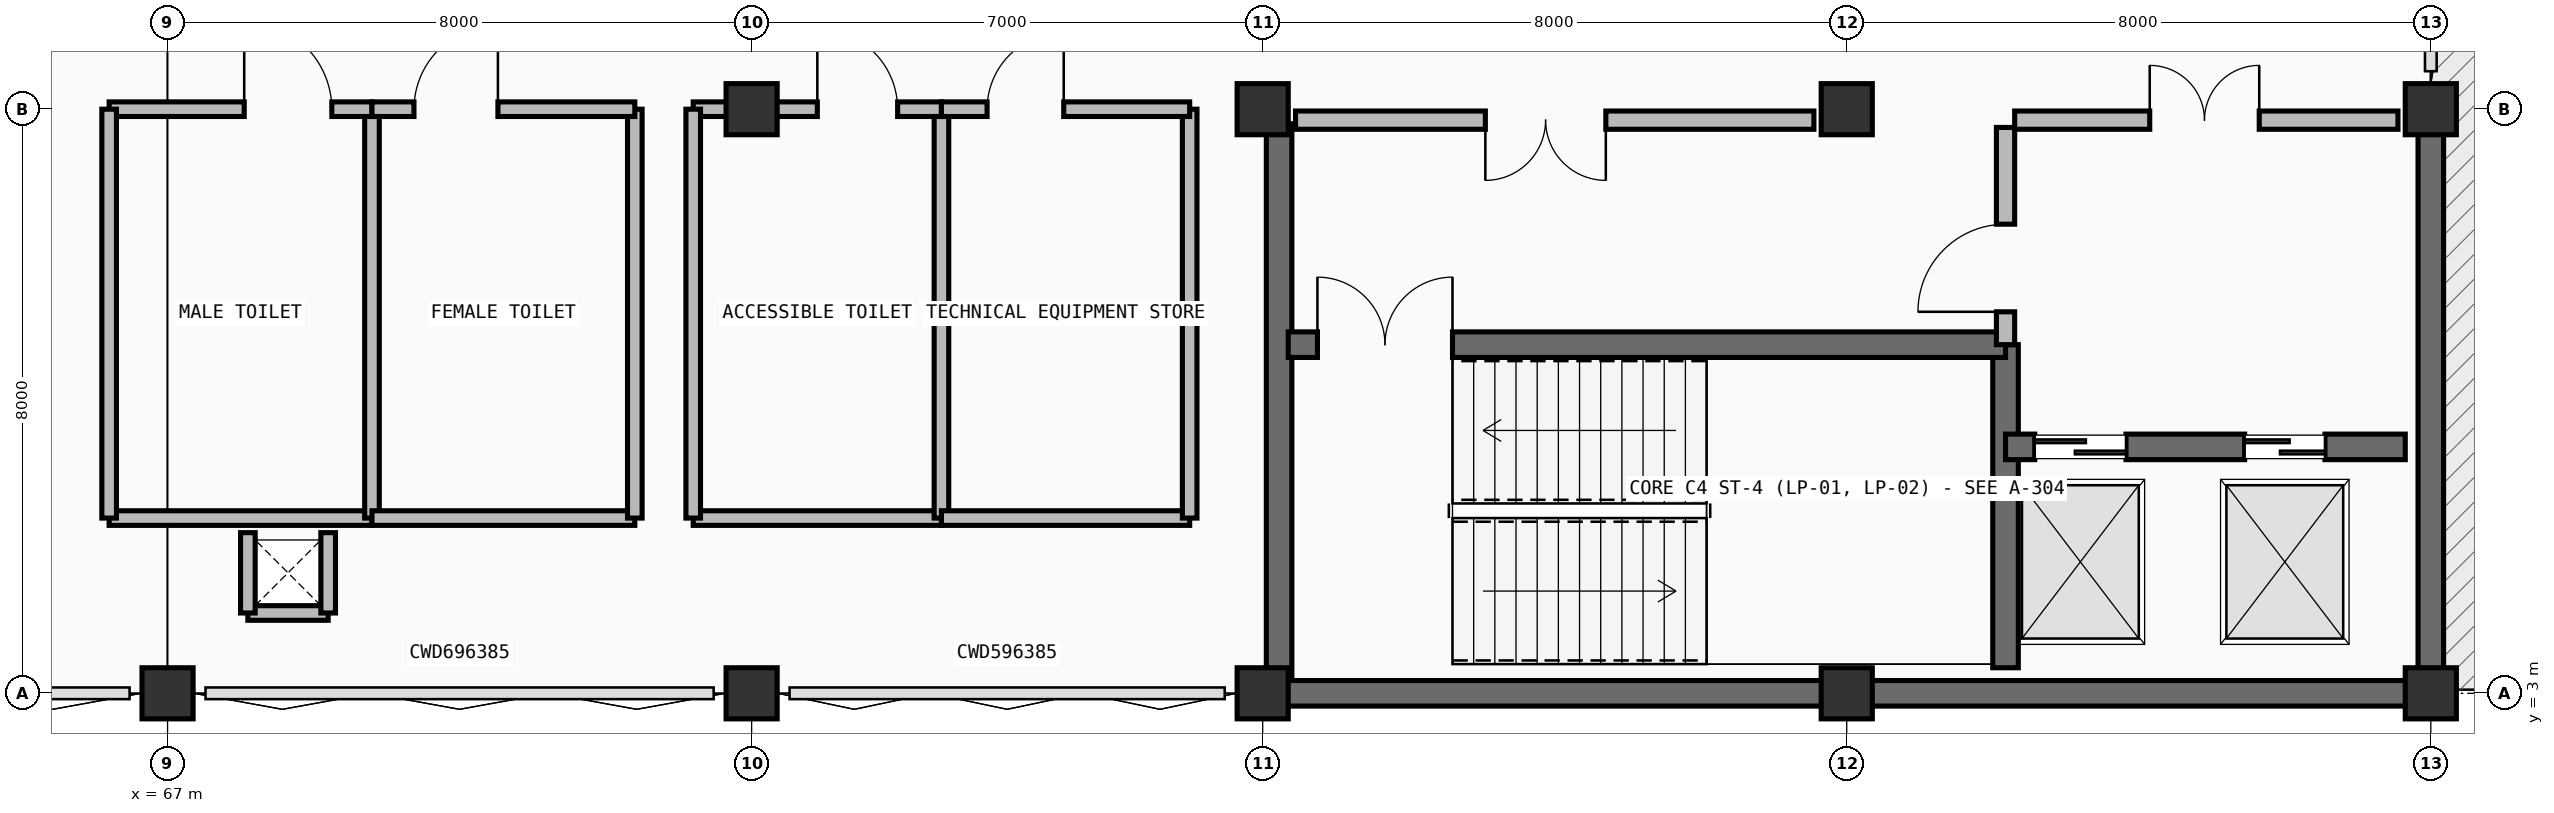
"""IFC4 building model, lengths in metres.
Left out: names, types, materials, properties, quantities, classifications, styles, units other than length and angle.
Written with IfcOpenShell. Run it as: python <this file> out.ifc"""

import sys

from ifc_helpers import new_model, si_unit, direction, frame, frame_2d, origin, origin_2d, place, context, subcontext, project, spatial, rectangle, extrude, element, fill, save


model = new_model("IFC4")
c1 = context("Model", 3, precision=1e-05, world=origin(), true_north=direction((0.0, 1.0)))
c2 = subcontext(c1, "Body", "Model", "MODEL_VIEW")
j1 = project(units=[si_unit("LENGTHUNIT", "METRE"), si_unit("PLANEANGLEUNIT", "RADIAN")], contexts=[c1])
p1 = place(None, origin())
s1 = spatial("IfcSite", under=j1, at=p1, CompositionType="ELEMENT")
p2 = place(p1, origin())
s2 = spatial("IfcBuilding", under=s1, at=p2, CompositionType="ELEMENT")
p3 = place(p2, frame((0.0, 0.0, 14.4)))
s3 = spatial("IfcBuildingStorey", under=s2, at=p3, CompositionType="ELEMENT", Elevation=14.4)
for number, where, z_axis, x_axis in (
    (1, (67.0, 3.0, 0.0), (0.0, 0.0, 1.0), (1.0, 0.0, 0.0)),
    (2, (75.0, 3.0, 0.0), (0.0, 0.0, 1.0), (1.0, 0.0, 0.0)),
    (3, (75.0, 11.0, 0.0), (0.0, 0.0, 1.0), (1.0, 0.0, 0.0)),
    (4, (82.0, 3.0, 0.0), (0.0, 0.0, 1.0), (1.0, 0.0, 0.0)),
    (5, (82.0, 11.0, 0.0), (0.0, 0.0, 1.0), (1.0, 0.0, 0.0)),
    (6, (90.0, 3.0, 0.0), (0.0, 0.0, 1.0), (1.0, 0.0, 0.0)),
    (7, (90.0, 11.0, 0.0), (0.0, 0.0, 1.0), (1.0, 0.0, 0.0)),
    (8, (98.0, 3.0, 0.0), (0.0, 0.0, 1.0), (1.0, 0.0, 0.0)),
    (9, (98.0, 11.0, 0.0), (0.0, 0.0, 1.0), (1.0, 0.0, 0.0)),
):
    element("IfcColumn", number, at=place(p3, frame(where, z_axis=z_axis, x_axis=x_axis)), inside=s3, PredefinedType="COLUMN", context=c2, shape_type="SweptSolid", body=[
        extrude(rectangle(XDim=0.7, YDim=0.7, at=origin_2d()), origin(), (0.0, 0.0, 1.0), 4.5),
    ])
for number, where, z_axis, x_axis in (
    (10, (98.0, 11.0, 0.0), (0.0, 0.0, 1.0), (0.0, -1.0, 0.0)),
    (11, (98.0, 3.0, 0.0), (0.0, 0.0, 1.0), (-1.0, 0.0, 0.0)),
    (12, (90.0, 3.0, 0.0), (0.0, 0.0, 1.0), (-1.0, 0.0, 0.0)),
):
    element("IfcWall", number, at=place(p3, frame(where, z_axis=z_axis, x_axis=x_axis)), inside=s3, PredefinedType="SHEAR", context=c2, shape_type="SweptSolid", body=[
        extrude(rectangle(XDim=8.0, YDim=0.35, at=frame_2d((4.0, 0.0))), origin(), (0.0, 0.0, 1.0), 4.5),
    ])
p4 = place(p3, frame((82.225, 3.2, 0.0), z_axis=(0.0, 0.0, 1.0), x_axis=(0.0, 1.0, 0.0)))
e13 = element("IfcWall", 13, at=p4, inside=s3, PredefinedType="SHEAR", context=c2, shape_type="SweptSolid", body=[
    extrude(rectangle(XDim=7.6, YDim=0.35, at=frame_2d((3.8, 0.0))), origin(), (0.0, 0.0, 1.0), 4.2),
])
p5 = place(p3, frame((92.175, 3.35, 0.0), z_axis=(0.0, 0.0, 1.0), x_axis=(0.0, 1.0, 0.0)))
e14 = element("IfcWall", 14, at=p5, inside=s3, PredefinedType="SHEAR", context=c2, shape_type="SweptSolid", body=[
    extrude(rectangle(XDim=4.425, YDim=0.35, at=frame_2d((2.212, 0.0))), origin(), (0.0, 0.0, 1.0), 4.2),
])
p6 = place(p3, frame((82.35, 7.775, 0.0), z_axis=(0.0, 0.0, 1.0), x_axis=(1.0, 0.0, 0.0)))
e15 = element("IfcWall", 15, at=p6, inside=s3, PredefinedType="SHEAR", context=c2, shape_type="SweptSolid", body=[
    extrude(rectangle(XDim=9.825, YDim=0.35, at=frame_2d((4.913, 0.0))), origin(), (0.0, 0.0, 1.0), 4.2),
])
p7 = place(p6, frame((0.4, 0.0, 0.0)))
e16 = element("IfcOpeningElement", 16, at=p7, cuts=e15, PredefinedType="OPENING", context=c2, shape_type="SweptSolid", body=[
    extrude(rectangle(XDim=1.85, YDim=2.25, at=frame_2d((0.925, 1.125))), frame((0.0, 0.185, 0.0), z_axis=(0.0, -1.0, 0.0), x_axis=(1.0, 0.0, 0.0)), (0.0, 0.0, 1.0), 0.37),
])
p8 = place(p3, frame((92.175, 6.375, 0.0), z_axis=(0.0, 0.0, 1.0), x_axis=(1.0, 0.0, 0.0)))
e17 = element("IfcWall", 17, at=p8, inside=s3, PredefinedType="SHEAR", context=c2, shape_type="SweptSolid", body=[
    extrude(rectangle(XDim=5.475, YDim=0.35, at=frame_2d((2.737, 0.0))), origin(), (0.0, 0.0, 1.0), 4.2),
])
p9 = place(p8, frame((0.4, 0.0, 0.0)))
e18 = element("IfcOpeningElement", 18, at=p9, cuts=e17, PredefinedType="OPENING", context=c2, shape_type="SweptSolid", body=[
    extrude(rectangle(XDim=1.25, YDim=2.25, at=frame_2d((0.625, 1.125))), frame((0.0, 0.185, 0.0), z_axis=(0.0, -1.0, 0.0), x_axis=(1.0, 0.0, 0.0)), (0.0, 0.0, 1.0), 0.37),
])
p10 = place(p8, frame((3.275, 0.0, 0.0)))
e19 = element("IfcOpeningElement", 19, at=p10, cuts=e17, PredefinedType="OPENING", context=c2, shape_type="SweptSolid", body=[
    extrude(rectangle(XDim=1.1, YDim=2.2, at=frame_2d((0.55, 1.1))), frame((0.0, 0.185, 0.0), z_axis=(0.0, -1.0, 0.0), x_axis=(1.0, 0.0, 0.0)), (0.0, 0.0, 1.0), 0.37),
])
p11 = place(p3, frame((92.175, 7.775, 0.0), z_axis=(0.0, 0.0, 1.0), x_axis=(0.0, 1.0, 0.0)))
e20 = element("IfcWall", 20, at=p11, inside=s3, PredefinedType="PARTITIONING", context=c2, shape_type="SweptSolid", body=[
    extrude(rectangle(XDim=2.975, YDim=0.25, at=frame_2d((1.488, 0.0))), origin(), (0.0, 0.0, 1.0), 4.2),
])
p12 = place(p11, frame((0.45, 0.0, 0.0)))
e21 = element("IfcOpeningElement", 21, at=p12, cuts=e20, PredefinedType="OPENING", context=c2, shape_type="SweptSolid", body=[
    extrude(rectangle(XDim=1.2, YDim=2.2, at=frame_2d((0.6, 1.1))), frame((0.0, 0.135, 0.0), z_axis=(0.0, -1.0, 0.0), x_axis=(1.0, 0.0, 0.0)), (0.0, 0.0, 1.0), 0.27),
])
p13 = place(p3, frame((82.45, 10.85, 0.0), z_axis=(0.0, 0.0, 1.0), x_axis=(1.0, 0.0, 0.0)))
e22 = element("IfcWall", 22, at=p13, inside=s3, PredefinedType="PARTITIONING", context=c2, shape_type="SweptSolid", body=[
    extrude(rectangle(XDim=7.1, YDim=0.25, at=frame_2d((3.55, 0.0))), origin(), (0.0, 0.0, 1.0), 3.535),
])
p14 = place(p13, frame((2.6, 0.0, 0.0)))
e23 = element("IfcOpeningElement", 23, at=p14, cuts=e22, PredefinedType="OPENING", context=c2, shape_type="SweptSolid", body=[
    extrude(rectangle(XDim=1.65, YDim=2.25, at=frame_2d((0.825, 1.125))), frame((0.0, 0.135, 0.0), z_axis=(0.0, -1.0, 0.0), x_axis=(1.0, 0.0, 0.0)), (0.0, 0.0, 1.0), 0.27),
])
p15 = place(p3, frame((92.3, 10.85, 0.0), z_axis=(0.0, 0.0, 1.0), x_axis=(1.0, 0.0, 0.0)))
e24 = element("IfcWall", 24, at=p15, inside=s3, PredefinedType="PARTITIONING", context=c2, shape_type="SweptSolid", body=[
    extrude(rectangle(XDim=5.25, YDim=0.25, at=frame_2d((2.625, 0.0))), origin(), (0.0, 0.0, 1.0), 3.535),
])
p16 = place(p15, frame((1.85, 0.0, 0.0)))
e25 = element("IfcOpeningElement", 25, at=p16, cuts=e24, PredefinedType="OPENING", context=c2, shape_type="SweptSolid", body=[
    extrude(rectangle(XDim=1.5, YDim=2.2, at=frame_2d((0.75, 1.1))), frame((0.0, 0.135, 0.0), z_axis=(0.0, -1.0, 0.0), x_axis=(1.0, 0.0, 0.0)), (0.0, 0.0, 1.0), 0.27),
])
p17 = place(p3, frame((66.2, 5.4, 0.0), z_axis=(0.0, 0.0, 1.0), x_axis=(1.0, 0.0, 0.0)))
e26 = element("IfcWall", 26, at=p17, inside=s3, PredefinedType="PARTITIONING", context=c2, shape_type="SweptSolid", body=[
    extrude(rectangle(XDim=3.6, YDim=0.2, at=frame_2d((1.8, 0.0))), origin(), (0.0, 0.0, 1.0), 4.2),
])
p18 = place(p3, frame((69.8, 5.4, 0.0), z_axis=(0.0, 0.0, 1.0), x_axis=(0.0, 1.0, 0.0)))
e27 = element("IfcWall", 27, at=p18, inside=s3, PredefinedType="PARTITIONING", context=c2, shape_type="SweptSolid", body=[
    extrude(rectangle(XDim=5.6, YDim=0.2, at=frame_2d((2.8, 0.0))), origin(), (0.0, 0.0, 1.0), 4.2),
])
p19 = place(p3, frame((66.2, 11.0, 0.0), z_axis=(0.0, 0.0, 1.0), x_axis=(1.0, 0.0, 0.0)))
e28 = element("IfcWall", 28, at=p19, inside=s3, PredefinedType="PARTITIONING", context=c2, shape_type="SweptSolid", body=[
    extrude(rectangle(XDim=3.6, YDim=0.2, at=frame_2d((1.8, 0.0))), origin(), (0.0, 0.0, 1.0), 3.035),
])
p20 = place(p19, frame((1.85, 0.0, 0.0)))
e29 = element("IfcOpeningElement", 29, at=p20, cuts=e28, PredefinedType="OPENING", context=c2, shape_type="SweptSolid", body=[
    extrude(rectangle(XDim=1.2, YDim=2.2, at=frame_2d((0.6, 1.1))), frame((0.0, 0.11, 0.0), z_axis=(0.0, -1.0, 0.0), x_axis=(1.0, 0.0, 0.0)), (0.0, 0.0, 1.0), 0.22),
])
p21 = place(p3, frame((66.2, 5.4, 0.0), z_axis=(0.0, 0.0, 1.0), x_axis=(0.0, 1.0, 0.0)))
e30 = element("IfcWall", 30, at=p21, inside=s3, PredefinedType="PARTITIONING", context=c2, shape_type="SweptSolid", body=[
    extrude(rectangle(XDim=5.6, YDim=0.2, at=frame_2d((2.8, 0.0))), origin(), (0.0, 0.0, 1.0), 4.2),
])
p22 = place(p3, frame((69.8, 5.4, 0.0), z_axis=(0.0, 0.0, 1.0), x_axis=(1.0, 0.0, 0.0)))
e31 = element("IfcWall", 31, at=p22, inside=s3, PredefinedType="PARTITIONING", context=c2, shape_type="SweptSolid", body=[
    extrude(rectangle(XDim=3.6, YDim=0.2, at=frame_2d((1.8, 0.0))), origin(), (0.0, 0.0, 1.0), 4.2),
])
p23 = place(p3, frame((73.4, 5.4, 0.0), z_axis=(0.0, 0.0, 1.0), x_axis=(0.0, 1.0, 0.0)))
e32 = element("IfcWall", 32, at=p23, inside=s3, PredefinedType="PARTITIONING", context=c2, shape_type="SweptSolid", body=[
    extrude(rectangle(XDim=5.6, YDim=0.2, at=frame_2d((2.8, 0.0))), origin(), (0.0, 0.0, 1.0), 4.2),
])
p24 = place(p3, frame((69.8, 11.0, 0.0), z_axis=(0.0, 0.0, 1.0), x_axis=(1.0, 0.0, 0.0)))
e33 = element("IfcWall", 33, at=p24, inside=s3, PredefinedType="PARTITIONING", context=c2, shape_type="SweptSolid", body=[
    extrude(rectangle(XDim=3.6, YDim=0.2, at=frame_2d((1.8, 0.0))), origin(), (0.0, 0.0, 1.0), 3.035),
])
p25 = place(p24, frame((0.575, 0.0, 0.0)))
e34 = element("IfcOpeningElement", 34, at=p25, cuts=e33, PredefinedType="OPENING", context=c2, shape_type="SweptSolid", body=[
    extrude(rectangle(XDim=1.15, YDim=2.18, at=frame_2d((0.575, 1.09))), frame((0.0, 0.11, 0.0), z_axis=(0.0, -1.0, 0.0), x_axis=(1.0, 0.0, 0.0)), (0.0, 0.0, 1.0), 0.22),
])
p26 = place(p3, frame((74.2, 5.4, 0.0), z_axis=(0.0, 0.0, 1.0), x_axis=(1.0, 0.0, 0.0)))
e35 = element("IfcWall", 35, at=p26, inside=s3, PredefinedType="PARTITIONING", context=c2, shape_type="SweptSolid", body=[
    extrude(rectangle(XDim=3.4, YDim=0.2, at=frame_2d((1.7, 0.0))), origin(), (0.0, 0.0, 1.0), 4.2),
])
p27 = place(p3, frame((77.6, 5.4, 0.0), z_axis=(0.0, 0.0, 1.0), x_axis=(0.0, 1.0, 0.0)))
e36 = element("IfcWall", 36, at=p27, inside=s3, PredefinedType="PARTITIONING", context=c2, shape_type="SweptSolid", body=[
    extrude(rectangle(XDim=5.6, YDim=0.2, at=frame_2d((2.8, 0.0))), origin(), (0.0, 0.0, 1.0), 4.2),
])
p28 = place(p3, frame((74.2, 11.0, 0.0), z_axis=(0.0, 0.0, 1.0), x_axis=(1.0, 0.0, 0.0)))
e37 = element("IfcWall", 37, at=p28, inside=s3, PredefinedType="PARTITIONING", context=c2, shape_type="SweptSolid", body=[
    extrude(rectangle(XDim=3.4, YDim=0.2, at=frame_2d((1.7, 0.0))), origin(), (0.0, 0.0, 1.0), 3.035),
])
p29 = place(p28, frame((1.7, 0.0, 0.0)))
e38 = element("IfcOpeningElement", 38, at=p29, cuts=e37, PredefinedType="OPENING", context=c2, shape_type="SweptSolid", body=[
    extrude(rectangle(XDim=1.1, YDim=2.15, at=frame_2d((0.55, 1.075))), frame((0.0, 0.11, 0.0), z_axis=(0.0, -1.0, 0.0), x_axis=(1.0, 0.0, 0.0)), (0.0, 0.0, 1.0), 0.22),
])
p30 = place(p3, frame((74.2, 5.4, 0.0), z_axis=(0.0, 0.0, 1.0), x_axis=(0.0, 1.0, 0.0)))
e39 = element("IfcWall", 39, at=p30, inside=s3, PredefinedType="PARTITIONING", context=c2, shape_type="SweptSolid", body=[
    extrude(rectangle(XDim=5.6, YDim=0.2, at=frame_2d((2.8, 0.0))), origin(), (0.0, 0.0, 1.0), 4.2),
])
p31 = place(p3, frame((77.6, 5.4, 0.0), z_axis=(0.0, 0.0, 1.0), x_axis=(1.0, 0.0, 0.0)))
e40 = element("IfcWall", 40, at=p31, inside=s3, PredefinedType="PARTITIONING", context=c2, shape_type="SweptSolid", body=[
    extrude(rectangle(XDim=3.4, YDim=0.2, at=frame_2d((1.7, 0.0))), origin(), (0.0, 0.0, 1.0), 4.2),
])
p32 = place(p3, frame((81.0, 5.4, 0.0), z_axis=(0.0, 0.0, 1.0), x_axis=(0.0, 1.0, 0.0)))
e41 = element("IfcWall", 41, at=p32, inside=s3, PredefinedType="PARTITIONING", context=c2, shape_type="SweptSolid", body=[
    extrude(rectangle(XDim=5.6, YDim=0.2, at=frame_2d((2.8, 0.0))), origin(), (0.0, 0.0, 1.0), 4.2),
])
p33 = place(p3, frame((77.6, 11.0, 0.0), z_axis=(0.0, 0.0, 1.0), x_axis=(1.0, 0.0, 0.0)))
e42 = element("IfcWall", 42, at=p33, inside=s3, PredefinedType="PARTITIONING", context=c2, shape_type="SweptSolid", body=[
    extrude(rectangle(XDim=3.4, YDim=0.2, at=frame_2d((1.7, 0.0))), origin(), (0.0, 0.0, 1.0), 3.535),
])
p34 = place(p33, frame((0.625, 0.0, 0.0)))
e43 = element("IfcOpeningElement", 43, at=p34, cuts=e42, PredefinedType="OPENING", context=c2, shape_type="SweptSolid", body=[
    extrude(rectangle(XDim=1.05, YDim=2.16, at=frame_2d((0.525, 1.08))), frame((0.0, 0.11, 0.0), z_axis=(0.0, -1.0, 0.0), x_axis=(1.0, 0.0, 0.0)), (0.0, 0.0, 1.0), 0.22),
])
for number, where, z_axis, x_axis in (
    (44, (68.1, 4.1, 0.0), (0.0, 0.0, 1.0), (1.0, 0.0, 0.0)),
    (45, (68.1, 4.1, 0.0), (0.0, 0.0, 1.0), (0.0, 1.0, 0.0)),
    (46, (69.2, 4.1, 0.0), (0.0, 0.0, 1.0), (0.0, 1.0, 0.0)),
):
    element("IfcWall", number, at=place(p3, frame(where, z_axis=z_axis, x_axis=x_axis)), inside=s3, PredefinedType="PARTITIONING", context=c2, shape_type="SweptSolid", body=[
        extrude(rectangle(XDim=1.1, YDim=0.2, at=frame_2d((0.55, 0.0))), origin(), (0.0, 0.0, 1.0), 4.2),
    ])
p35 = place(p7, origin())
e47 = element("IfcDoor", 47, at=p35, inside=s3, OperationType="DOUBLE_DOOR_SINGLE_SWING", PredefinedType="DOOR", context=c2, shape_type="SweptSolid", body=[
    extrude(rectangle(XDim=1.85, YDim=2.25, at=frame_2d((0.925, 1.125))), frame((0.0, 0.025, 0.0), z_axis=(0.0, -1.0, 0.0), x_axis=(1.0, 0.0, 0.0)), (0.0, 0.0, 1.0), 0.05),
])
fill(e16, e47)
p36 = place(p9, origin())
e48 = element("IfcDoor", 48, at=p36, inside=s3, OperationType="DOUBLE_DOOR_SLIDING", PredefinedType="DOOR", context=c2, shape_type="SweptSolid", body=[
    extrude(rectangle(XDim=1.25, YDim=2.25, at=frame_2d((0.625, 1.125))), frame((0.0, 0.025, 0.0), z_axis=(0.0, -1.0, 0.0), x_axis=(1.0, 0.0, 0.0)), (0.0, 0.0, 1.0), 0.05),
])
fill(e18, e48)
p37 = place(p10, origin())
e49 = element("IfcDoor", 49, at=p37, inside=s3, OperationType="DOUBLE_DOOR_SLIDING", PredefinedType="DOOR", context=c2, shape_type="SweptSolid", body=[
    extrude(rectangle(XDim=1.1, YDim=2.2, at=frame_2d((0.55, 1.1))), frame((0.0, 0.025, 0.0), z_axis=(0.0, -1.0, 0.0), x_axis=(1.0, 0.0, 0.0)), (0.0, 0.0, 1.0), 0.05),
])
fill(e19, e49)
p38 = place(p12, origin())
e50 = element("IfcDoor", 50, at=p38, inside=s3, OperationType="SINGLE_SWING_LEFT", PredefinedType="DOOR", context=c2, shape_type="SweptSolid", body=[
    extrude(rectangle(XDim=1.2, YDim=2.2, at=frame_2d((0.6, 1.1))), frame((0.0, 0.025, 0.0), z_axis=(0.0, -1.0, 0.0), x_axis=(1.0, 0.0, 0.0)), (0.0, 0.0, 1.0), 0.05),
])
fill(e21, e50)
p39 = place(p14, frame((1.65, 0.0, 0.0), z_axis=(0.0, 0.0, 1.0), x_axis=(-1.0, 0.0, 0.0)))
e51 = element("IfcDoor", 51, at=p39, inside=s3, OperationType="DOUBLE_DOOR_SINGLE_SWING", PredefinedType="DOOR", context=c2, shape_type="SweptSolid", body=[
    extrude(rectangle(XDim=1.65, YDim=2.25, at=frame_2d((0.825, 1.125))), frame((0.0, 0.025, 0.0), z_axis=(0.0, -1.0, 0.0), x_axis=(1.0, 0.0, 0.0)), (0.0, 0.0, 1.0), 0.05),
])
fill(e23, e51)
p40 = place(p16, origin())
e52 = element("IfcDoor", 52, at=p40, inside=s3, OperationType="DOUBLE_DOOR_SINGLE_SWING", PredefinedType="DOOR", context=c2, shape_type="SweptSolid", body=[
    extrude(rectangle(XDim=1.5, YDim=2.2, at=frame_2d((0.75, 1.1))), frame((0.0, 0.025, 0.0), z_axis=(0.0, -1.0, 0.0), x_axis=(1.0, 0.0, 0.0)), (0.0, 0.0, 1.0), 0.05),
])
fill(e25, e52)
p41 = place(p20, origin())
e53 = element("IfcDoor", 53, at=p41, inside=s3, OperationType="SINGLE_SWING_LEFT", PredefinedType="DOOR", context=c2, shape_type="SweptSolid", body=[
    extrude(rectangle(XDim=1.2, YDim=2.2, at=frame_2d((0.6, 1.1))), frame((0.0, 0.025, 0.0), z_axis=(0.0, -1.0, 0.0), x_axis=(1.0, 0.0, 0.0)), (0.0, 0.0, 1.0), 0.05),
])
fill(e29, e53)
p42 = place(p25, origin())
e54 = element("IfcDoor", 54, at=p42, inside=s3, OperationType="SINGLE_SWING_RIGHT", PredefinedType="DOOR", context=c2, shape_type="SweptSolid", body=[
    extrude(rectangle(XDim=1.15, YDim=2.18, at=frame_2d((0.575, 1.09))), frame((0.0, 0.025, 0.0), z_axis=(0.0, -1.0, 0.0), x_axis=(1.0, 0.0, 0.0)), (0.0, 0.0, 1.0), 0.05),
])
fill(e34, e54)
p43 = place(p29, origin())
e55 = element("IfcDoor", 55, at=p43, inside=s3, OperationType="SINGLE_SWING_LEFT", PredefinedType="DOOR", context=c2, shape_type="SweptSolid", body=[
    extrude(rectangle(XDim=1.1, YDim=2.15, at=frame_2d((0.55, 1.075))), frame((0.0, 0.025, 0.0), z_axis=(0.0, -1.0, 0.0), x_axis=(1.0, 0.0, 0.0)), (0.0, 0.0, 1.0), 0.05),
])
fill(e38, e55)
p44 = place(p34, origin())
e56 = element("IfcDoor", 56, at=p44, inside=s3, OperationType="SINGLE_SWING_RIGHT", PredefinedType="DOOR", context=c2, shape_type="SweptSolid", body=[
    extrude(rectangle(XDim=1.05, YDim=2.16, at=frame_2d((0.525, 1.08))), frame((0.0, 0.025, 0.0), z_axis=(0.0, -1.0, 0.0), x_axis=(1.0, 0.0, 0.0)), (0.0, 0.0, 1.0), 0.05),
])
fill(e43, e56)
save(model, sys.argv[1])
